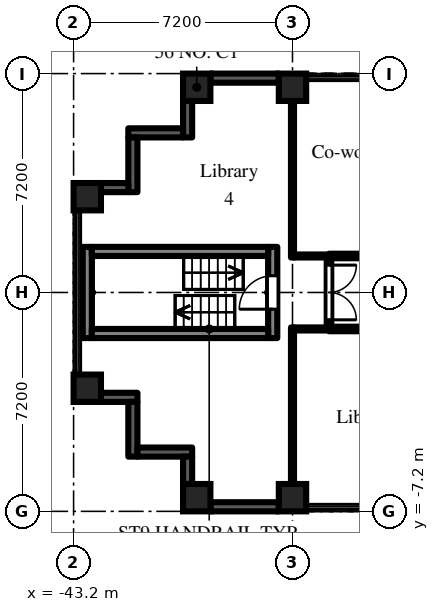
"""IFC4 building model, lengths in metres.
Left out: names, types, materials, properties, quantities, classifications, styles, units other than length and angle.
Written with IfcOpenShell. Run it as: python <this file> out.ifc"""

import sys

from ifc_helpers import new_model, si_unit, direction, frame, frame_2d, origin, origin_2d, place, context, subcontext, project, spatial, rectangle, extrude, element, fill, save


model = new_model("IFC4")
c1 = context("Model", 3, precision=1e-05, world=origin(), true_north=direction((0.0, 1.0)))
c2 = subcontext(c1, "Body", "Model", "MODEL_VIEW")
j1 = project(units=[si_unit("LENGTHUNIT", "METRE"), si_unit("PLANEANGLEUNIT", "RADIAN")], contexts=[c1])
p1 = place(None, origin())
s1 = spatial("IfcSite", under=j1, at=p1, CompositionType="ELEMENT")
p2 = place(p1, origin())
s2 = spatial("IfcBuilding", under=s1, at=p2, CompositionType="ELEMENT")
p3 = place(p2, frame((0.0, 0.0, 7.2)))
s3 = spatial("IfcBuildingStorey", under=s2, at=p3, CompositionType="ELEMENT", Elevation=7.2)
for number, where, z_axis, x_axis in (
    (1, (-42.75, -3.15, 0.0), (0.0, 0.0, 1.0), (1.0, 0.0, 0.0)),
    (2, (-42.75, 3.15, 0.0), (0.0, 0.0, 1.0), (1.0, 0.0, 0.0)),
    (3, (-39.15, -6.75, 0.0), (0.0, 0.0, 1.0), (1.0, 0.0, 0.0)),
    (4, (-39.15, 6.75, 0.0), (0.0, 0.0, 1.0), (1.0, 0.0, 0.0)),
    (5, (-36.0, -6.75, 0.0), (0.0, 0.0, 1.0), (1.0, 0.0, 0.0)),
    (6, (-36.0, 6.75, 0.0), (0.0, 0.0, 1.0), (1.0, 0.0, 0.0)),
):
    element("IfcColumn", number, at=place(p3, frame(where, z_axis=z_axis, x_axis=x_axis)), inside=s3, PredefinedType="COLUMN", context=c2, shape_type="SweptSolid", body=[
        extrude(rectangle(XDim=0.9, YDim=0.9, at=origin_2d()), origin(), (0.0, 0.0, 1.0), 4.5),
    ])
p4 = place(p3, frame((-36.45, 7.05, 0.0), z_axis=(0.0, 0.0, 1.0), x_axis=(-1.0, 0.0, 0.0)))
e7 = element("IfcWall", 7, at=p4, inside=s3, PredefinedType="SOLIDWALL", context=c2, shape_type="SweptSolid", body=[
    extrude(rectangle(XDim=2.25, YDim=0.3, at=frame_2d((1.125, 0.0))), origin(), (0.0, 0.0, 1.0), 3.6),
])
p5 = place(p3, frame((-39.45, 6.3, 0.0), z_axis=(0.0, 0.0, 1.0), x_axis=(0.0, -1.0, 0.0)))
e8 = element("IfcWall", 8, at=p5, inside=s3, PredefinedType="SOLIDWALL", context=c2, shape_type="SweptSolid", body=[
    extrude(rectangle(XDim=1.2, YDim=0.3, at=frame_2d((0.6, 0.0))), origin(), (0.0, 0.0, 1.0), 4.075),
])
p6 = place(p3, frame((-39.6, 5.25, 0.0), z_axis=(0.0, 0.0, 1.0), x_axis=(-1.0, 0.0, 0.0)))
e9 = element("IfcWall", 9, at=p6, inside=s3, PredefinedType="SOLIDWALL", context=c2, shape_type="SweptSolid", body=[
    extrude(rectangle(XDim=1.8, YDim=0.3, at=frame_2d((0.9, 0.0))), origin(), (0.0, 0.0, 1.0), 4.075),
])
p7 = place(p3, frame((-41.25, 5.1, 0.0), z_axis=(0.0, 0.0, 1.0), x_axis=(0.0, -1.0, 0.0)))
e10 = element("IfcWall", 10, at=p7, inside=s3, PredefinedType="SOLIDWALL", context=c2, shape_type="SweptSolid", body=[
    extrude(rectangle(XDim=1.8, YDim=0.3, at=frame_2d((0.9, 0.0))), origin(), (0.0, 0.0, 1.0), 4.075),
])
p8 = place(p3, frame((-41.4, 3.45, 0.0), z_axis=(0.0, 0.0, 1.0), x_axis=(-1.0, 0.0, 0.0)))
e11 = element("IfcWall", 11, at=p8, inside=s3, PredefinedType="SOLIDWALL", context=c2, shape_type="SweptSolid", body=[
    extrude(rectangle(XDim=0.9, YDim=0.3, at=frame_2d((0.45, 0.0))), origin(), (0.0, 0.0, 1.0), 4.075),
])
p9 = place(p3, frame((-42.3, -3.45, 0.0), z_axis=(0.0, 0.0, 1.0), x_axis=(1.0, 0.0, 0.0)))
e12 = element("IfcWall", 12, at=p9, inside=s3, PredefinedType="SOLIDWALL", context=c2, shape_type="SweptSolid", body=[
    extrude(rectangle(XDim=1.2, YDim=0.3, at=frame_2d((0.6, 0.0))), origin(), (0.0, 0.0, 1.0), 4.075),
])
p10 = place(p3, frame((-41.25, -3.6, 0.0), z_axis=(0.0, 0.0, 1.0), x_axis=(0.0, -1.0, 0.0)))
e13 = element("IfcWall", 13, at=p10, inside=s3, PredefinedType="SOLIDWALL", context=c2, shape_type="SweptSolid", body=[
    extrude(rectangle(XDim=1.8, YDim=0.3, at=frame_2d((0.9, 0.0))), origin(), (0.0, 0.0, 1.0), 4.075),
])
p11 = place(p3, frame((-41.1, -5.25, 0.0), z_axis=(0.0, 0.0, 1.0), x_axis=(1.0, 0.0, 0.0)))
e14 = element("IfcWall", 14, at=p11, inside=s3, PredefinedType="SOLIDWALL", context=c2, shape_type="SweptSolid", body=[
    extrude(rectangle(XDim=1.8, YDim=0.3, at=frame_2d((0.9, 0.0))), origin(), (0.0, 0.0, 1.0), 4.075),
])
p12 = place(p3, frame((-39.45, -5.4, 0.0), z_axis=(0.0, 0.0, 1.0), x_axis=(0.0, -1.0, 0.0)))
e15 = element("IfcWall", 15, at=p12, inside=s3, PredefinedType="SOLIDWALL", context=c2, shape_type="SweptSolid", body=[
    extrude(rectangle(XDim=0.9, YDim=0.3, at=frame_2d((0.45, 0.0))), origin(), (0.0, 0.0, 1.0), 4.075),
])
p13 = place(p3, frame((-38.7, -7.05, 0.0), z_axis=(0.0, 0.0, 1.0), x_axis=(1.0, 0.0, 0.0)))
e16 = element("IfcWall", 16, at=p13, inside=s3, PredefinedType="SOLIDWALL", context=c2, shape_type="SweptSolid", body=[
    extrude(rectangle(XDim=2.25, YDim=0.3, at=frame_2d((1.125, 0.0))), origin(), (0.0, 0.0, 1.0), 3.6),
])
p14 = place(p3, frame((-36.65, -1.5, 0.0), z_axis=(0.0, 0.0, 1.0), x_axis=(0.0, 1.0, 0.0)))
e17 = element("IfcWall", 17, at=p14, inside=s3, PredefinedType="SHEAR", context=c2, shape_type="SweptSolid", body=[
    extrude(rectangle(XDim=3.0, YDim=0.3, at=frame_2d((1.5, 0.0))), origin(), (0.0, 0.0, 1.0), 4.075),
])
p15 = place(p14, frame((0.95, 0.0, 0.0)))
e18 = element("IfcOpeningElement", 18, at=p15, cuts=e17, PredefinedType="OPENING", context=c2, shape_type="SweptSolid", body=[
    extrude(rectangle(XDim=1.1, YDim=2.1, at=frame_2d((0.55, 1.05))), frame((0.0, 0.16, 0.0), z_axis=(0.0, -1.0, 0.0), x_axis=(1.0, 0.0, 0.0)), (0.0, 0.0, 1.0), 0.32),
])
p16 = place(p3, frame((-42.75, -1.5, 0.0), z_axis=(0.0, 0.0, 1.0), x_axis=(0.0, 1.0, 0.0)))
e19 = element("IfcWall", 19, at=p16, inside=s3, PredefinedType="SHEAR", context=c2, shape_type="SweptSolid", body=[
    extrude(rectangle(XDim=3.0, YDim=0.3, at=frame_2d((1.5, 0.0))), origin(), (0.0, 0.0, 1.0), 4.075),
])
for number, where, z_axis, x_axis in (
    (20, (-36.8, -1.35, 0.0), (0.0, 0.0, 1.0), (-1.0, 0.0, 0.0)),
    (21, (-36.8, 1.35, 0.0), (0.0, 0.0, 1.0), (-1.0, 0.0, 0.0)),
):
    element("IfcWall", number, at=place(p3, frame(where, z_axis=z_axis, x_axis=x_axis)), inside=s3, PredefinedType="SHEAR", context=c2, shape_type="SweptSolid", body=[
        extrude(rectangle(XDim=5.8, YDim=0.3, at=frame_2d((2.9, 0.0))), origin(), (0.0, 0.0, 1.0), 4.075),
    ])
p17 = place(p3, frame((-36.0, -6.9, 0.0), z_axis=(0.0, 0.0, 1.0), x_axis=(0.0, 1.0, 0.0)))
e22 = element("IfcWall", 22, at=p17, inside=s3, PredefinedType="PARTITIONING", context=c2, shape_type="SweptSolid", body=[
    extrude(rectangle(XDim=5.75, YDim=0.1, at=frame_2d((2.875, 0.0))), origin(), (0.0, 0.0, 1.0), 4.075),
])
p18 = place(p3, frame((-35.95, -1.2, 0.0), z_axis=(0.0, 0.0, 1.0), x_axis=(1.0, 0.0, 0.0)))
e23 = element("IfcWall", 23, at=p18, inside=s3, PredefinedType="PARTITIONING", context=c2, shape_type="SweptSolid", body=[
    extrude(rectangle(XDim=1.15, YDim=0.1, at=frame_2d((0.575, 0.0))), origin(), (0.0, 0.0, 1.0), 4.075),
])
p19 = place(p3, frame((-36.0, 1.15, 0.0), z_axis=(0.0, 0.0, 1.0), x_axis=(0.0, 1.0, 0.0)))
e24 = element("IfcWall", 24, at=p19, inside=s3, PredefinedType="PARTITIONING", context=c2, shape_type="SweptSolid", body=[
    extrude(rectangle(XDim=5.75, YDim=0.1, at=frame_2d((2.875, 0.0))), origin(), (0.0, 0.0, 1.0), 4.075),
])
p20 = place(p3, frame((-35.95, 1.2, 0.0), z_axis=(0.0, 0.0, 1.0), x_axis=(1.0, 0.0, 0.0)))
e25 = element("IfcWall", 25, at=p20, inside=s3, PredefinedType="PARTITIONING", context=c2, shape_type="SweptSolid", body=[
    extrude(rectangle(XDim=1.15, YDim=0.1, at=frame_2d((0.575, 0.0))), origin(), (0.0, 0.0, 1.0), 4.075),
])
p21 = place(p3, frame((-34.8, -1.125, 0.0), z_axis=(0.0, 0.0, 1.0), x_axis=(0.0, 1.0, 0.0)))
e26 = element("IfcWall", 26, at=p21, inside=s3, PredefinedType="PARTITIONING", context=c2, shape_type="SweptSolid", body=[
    extrude(rectangle(XDim=2.25, YDim=0.15, at=frame_2d((1.125, 0.0))), origin(), (0.0, 0.0, 1.0), 4.075),
])
p22 = place(p21, frame((0.225, 0.0, 0.0)))
e27 = element("IfcOpeningElement", 27, at=p22, cuts=e26, PredefinedType="OPENING", context=c2, shape_type="SweptSolid", body=[
    extrude(rectangle(XDim=1.8, YDim=2.1, at=frame_2d((0.9, 1.05))), frame((0.0, 0.085, 0.0), z_axis=(0.0, -1.0, 0.0), x_axis=(1.0, 0.0, 0.0)), (0.0, 0.0, 1.0), 0.17),
])
p23 = place(p3, frame((-34.8, -1.2, 0.0), z_axis=(0.0, 0.0, 1.0), x_axis=(1.0, 0.0, 0.0)))
e28 = element("IfcWall", 28, at=p23, inside=s3, PredefinedType="PARTITIONING", context=c2, shape_type="SweptSolid", body=[
    extrude(rectangle(XDim=13.2, YDim=0.15, at=frame_2d((6.6, 0.0))), origin(), (0.0, 0.0, 1.0), 4.075),
])
p24 = place(p23, frame((7.95, 0.0, 0.0)))
e29 = element("IfcOpeningElement", 29, at=p24, cuts=e28, PredefinedType="OPENING", context=c2, shape_type="SweptSolid", body=[
    extrude(rectangle(XDim=0.9, YDim=2.1, at=frame_2d((0.45, 1.05))), frame((0.0, 0.085, 0.0), z_axis=(0.0, -1.0, 0.0), x_axis=(1.0, 0.0, 0.0)), (0.0, 0.0, 1.0), 0.17),
])
p25 = place(p23, frame((1.35, 0.0, 0.0)))
e30 = element("IfcOpeningElement", 30, at=p25, cuts=e28, PredefinedType="OPENING", context=c2, shape_type="SweptSolid", body=[
    extrude(rectangle(XDim=0.9, YDim=2.1, at=frame_2d((0.45, 1.05))), frame((0.0, 0.085, 0.0), z_axis=(0.0, -1.0, 0.0), x_axis=(1.0, 0.0, 0.0)), (0.0, 0.0, 1.0), 0.17),
])
p26 = place(p3, frame((-34.8, 1.2, 0.0), z_axis=(0.0, 0.0, 1.0), x_axis=(1.0, 0.0, 0.0)))
e31 = element("IfcWall", 31, at=p26, inside=s3, PredefinedType="PARTITIONING", context=c2, shape_type="SweptSolid", body=[
    extrude(rectangle(XDim=13.2, YDim=0.15, at=frame_2d((6.6, 0.0))), origin(), (0.0, 0.0, 1.0), 4.075),
])
p27 = place(p26, frame((10.35, 0.0, 0.0)))
e32 = element("IfcOpeningElement", 32, at=p27, cuts=e31, PredefinedType="OPENING", context=c2, shape_type="SweptSolid", body=[
    extrude(rectangle(XDim=0.9, YDim=2.1, at=frame_2d((0.45, 1.05))), frame((0.0, 0.085, 0.0), z_axis=(0.0, -1.0, 0.0), x_axis=(1.0, 0.0, 0.0)), (0.0, 0.0, 1.0), 0.17),
])
p28 = place(p26, frame((3.75, 0.0, 0.0)))
e33 = element("IfcOpeningElement", 33, at=p28, cuts=e31, PredefinedType="OPENING", context=c2, shape_type="SweptSolid", body=[
    extrude(rectangle(XDim=0.9, YDim=2.1, at=frame_2d((0.45, 1.05))), frame((0.0, 0.085, 0.0), z_axis=(0.0, -1.0, 0.0), x_axis=(1.0, 0.0, 0.0)), (0.0, 0.0, 1.0), 0.17),
])
p29 = place(p15, origin())
e34 = element("IfcDoor", 34, at=p29, inside=s3, OperationType="SINGLE_SWING_LEFT", PredefinedType="DOOR", context=c2, shape_type="SweptSolid", body=[
    extrude(rectangle(XDim=1.1, YDim=2.1, at=frame_2d((0.55, 1.05))), frame((0.0, 0.025, 0.0), z_axis=(0.0, -1.0, 0.0), x_axis=(1.0, 0.0, 0.0)), (0.0, 0.0, 1.0), 0.05),
])
fill(e18, e34)
p30 = place(p22, frame((1.8, 0.0, 0.0), z_axis=(0.0, 0.0, 1.0), x_axis=(-1.0, 0.0, 0.0)))
e35 = element("IfcDoor", 35, at=p30, inside=s3, OperationType="DOUBLE_DOOR_DOUBLE_SWING", PredefinedType="DOOR", context=c2, shape_type="SweptSolid", body=[
    extrude(rectangle(XDim=1.8, YDim=2.1, at=frame_2d((0.9, 1.05))), frame((0.0, 0.025, 0.0), z_axis=(0.0, -1.0, 0.0), x_axis=(1.0, 0.0, 0.0)), (0.0, 0.0, 1.0), 0.05),
])
fill(e27, e35)
save(model, sys.argv[1])
